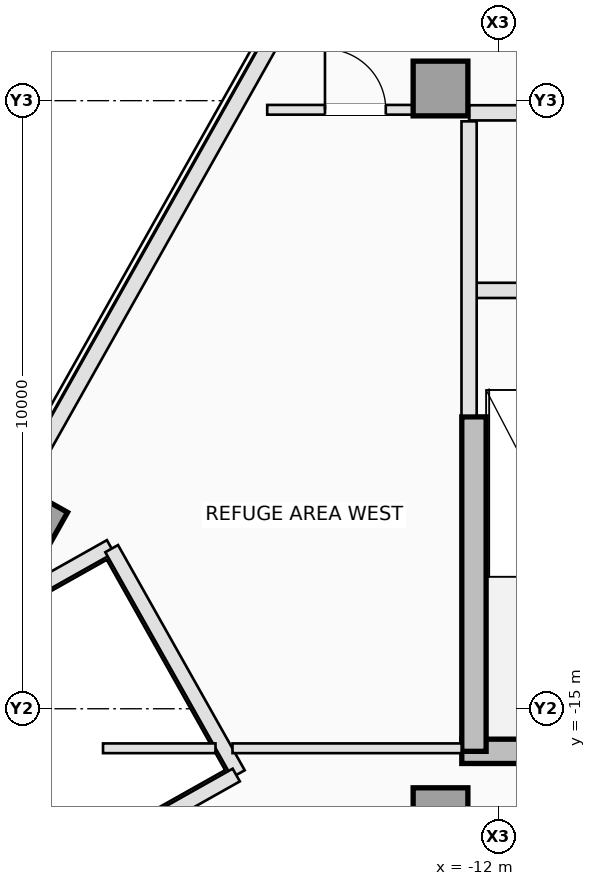
"""IFC4 building model, lengths in metres.
Left out: names, types, materials, properties, quantities, classifications, styles, units other than length and angle.
Written with IfcOpenShell. Run it as: python <this file> out.ifc"""

import sys

from ifc_helpers import new_model, si_unit, direction, frame, frame_2d, origin, origin_2d, place, context, subcontext, project, spatial, rectangle, extrude, element, fill, save


model = new_model("IFC4")
c1 = context("Model", 3, precision=1e-05, world=origin(), true_north=direction((0.0, 1.0)))
c2 = subcontext(c1, "Body", "Model", "MODEL_VIEW")
j1 = project(units=[si_unit("LENGTHUNIT", "METRE"), si_unit("PLANEANGLEUNIT", "RADIAN")], contexts=[c1])
p1 = place(None, origin())
s1 = spatial("IfcSite", under=j1, at=p1, CompositionType="ELEMENT")
p2 = place(p1, origin())
s2 = spatial("IfcBuilding", under=s1, at=p2, CompositionType="ELEMENT")
p3 = place(p2, frame((0.0, 0.0, 179.0)))
s3 = spatial("IfcBuildingStorey", under=s2, at=p3, CompositionType="ELEMENT", Elevation=179.0)
p4 = place(p3, frame((-12.6, -15.7, 0.0), z_axis=(0.0, 0.0, 1.0), x_axis=(1.0, 0.0, 0.0)))
e1 = element("IfcWall", 1, at=p4, inside=s3, PredefinedType="SHEAR", context=c2, shape_type="SweptSolid", body=[
    extrude(rectangle(XDim=3.8, YDim=0.4, at=frame_2d((1.9, 0.0))), origin(), (0.0, 0.0, 1.0), 4.4),
])
p5 = place(p3, frame((-12.4, -15.7, 0.0), z_axis=(0.0, 0.0, 1.0), x_axis=(0.0, 1.0, 0.0)))
e2 = element("IfcWall", 2, at=p5, inside=s3, PredefinedType="SHEAR", context=c2, shape_type="SweptSolid", body=[
    extrude(rectangle(XDim=5.5, YDim=0.4, at=frame_2d((2.75, 0.0))), origin(), (0.0, 0.0, 1.0), 4.4),
])
for number, where, z_axis, x_axis in (
    (3, (-12.95, -16.75, 0.0), (0.0, 0.0, 1.0), (1.0, 0.0, 0.0)),
    (4, (-12.95, -4.8, 0.0), (0.0, 0.0, 1.0), (1.0, 0.0, 0.0)),
    (5, (-19.697, -11.942, 0.0), (0.0, 0.0, 1.0), (-0.872, 0.49, 0.0)),
):
    element("IfcColumn", number, at=place(p3, frame(where, z_axis=z_axis, x_axis=x_axis)), inside=s3, PredefinedType="COLUMN", context=c2, shape_type="SweptSolid", body=[
        extrude(rectangle(XDim=0.9, YDim=0.9, at=origin_2d()), origin(), (0.0, 0.0, 1.0), 4.4),
    ])
p6 = place(p3, frame((-19.844, -11.337, 0.0), z_axis=(0.0, 0.0, 1.0), x_axis=(0.490246958575, 0.871583570066, 0.0)))
e6 = element("IfcWall", 6, at=p6, inside=s3, PredefinedType="STANDARD", context=c2, shape_type="SweptSolid", body=[
    extrude(rectangle(XDim=10.552, YDim=0.26, at=frame_2d((5.276, 0.0))), origin(), (0.0, 0.0, 1.0), 4.15),
])
p7 = place(p3, frame((-20.434, -13.489, 0.0), z_axis=(0.0, 0.0, 1.0), x_axis=(0.871578299909, 0.490256327984, 0.0)))
e7 = element("IfcWall", 7, at=p7, inside=s3, PredefinedType="STANDARD", context=c2, shape_type="SweptSolid", body=[
    extrude(rectangle(XDim=2.36, YDim=0.24, at=frame_2d((1.18, 0.0))), origin(), (0.0, 0.0, 1.0), 4.15),
])
p8 = place(p3, frame((-18.358, -12.366, 0.0), z_axis=(0.0, 0.0, 1.0), x_axis=(0.49027487746, -0.871567865706, 0.0)))
e8 = element("IfcWall", 8, at=p8, inside=s3, PredefinedType="STANDARD", context=c2, shape_type="SweptSolid", body=[
    extrude(rectangle(XDim=4.25, YDim=0.24, at=frame_2d((2.125, 0.0))), origin(), (0.0, 0.0, 1.0), 3.226),
])
p9 = place(p3, frame((-16.309, -16.09, 0.0), z_axis=(0.0, 0.0, 1.0), x_axis=(-0.871578299909, -0.490256327984, 0.0)))
e9 = element("IfcWall", 9, at=p9, inside=s3, PredefinedType="STANDARD", context=c2, shape_type="SweptSolid", body=[
    extrude(rectangle(XDim=2.36, YDim=0.24, at=frame_2d((1.18, 0.0))), origin(), (0.0, 0.0, 1.0), 4.15),
])
p10 = place(p3, frame((-12.38, -8.12, 0.0), z_axis=(0.0, 0.0, 1.0), x_axis=(1.0, 0.0, 0.0)))
e10 = element("IfcWall", 10, at=p10, inside=s3, PredefinedType="PARTITIONING", context=c2, shape_type="SweptSolid", body=[
    extrude(rectangle(XDim=3.22, YDim=0.25, at=frame_2d((1.61, 0.0))), origin(), (0.0, 0.0, 1.0), 4.15),
])
p11 = place(p3, frame((-12.48, -10.18, 0.0), z_axis=(0.0, 0.0, 1.0), x_axis=(0.0, 1.0, 0.0)))
e11 = element("IfcWall", 11, at=p11, inside=s3, PredefinedType="PARTITIONING", context=c2, shape_type="SweptSolid", body=[
    extrude(rectangle(XDim=4.84, YDim=0.25, at=frame_2d((2.42, 0.0))), origin(), (0.0, 0.0, 1.0), 4.15),
])
p12 = place(p3, frame((-12.48, -5.2, 0.0), z_axis=(0.0, 0.0, 1.0), x_axis=(1.0, 0.0, 0.0)))
e12 = element("IfcWall", 12, at=p12, inside=s3, PredefinedType="PARTITIONING", context=c2, shape_type="SweptSolid", body=[
    extrude(rectangle(XDim=8.278, YDim=0.25, at=frame_2d((4.139, 0.0))), origin(), (0.0, 0.0, 1.0), 4.15),
])
p13 = place(p12, frame((1.85, 0.0, 0.0)))
e13 = element("IfcOpeningElement", 13, at=p13, cuts=e12, PredefinedType="OPENING", context=c2, shape_type="SweptSolid", body=[
    extrude(rectangle(XDim=1.05, YDim=2.12, at=frame_2d((0.525, 1.06))), frame((0.0, 0.135, 0.0), z_axis=(0.0, -1.0, 0.0), x_axis=(1.0, 0.0, 0.0)), (0.0, 0.0, 1.0), 0.27),
])
p14 = place(p12, frame((6.15, 0.0, 0.0)))
e14 = element("IfcOpeningElement", 14, at=p14, cuts=e12, PredefinedType="OPENING", context=c2, shape_type="SweptSolid", body=[
    extrude(rectangle(XDim=1.05, YDim=2.12, at=frame_2d((0.525, 1.06))), frame((0.0, 0.135, 0.0), z_axis=(0.0, -1.0, 0.0), x_axis=(1.0, 0.0, 0.0)), (0.0, 0.0, 1.0), 0.27),
])
p15 = place(p3, frame((-18.5, -15.65, 0.0), z_axis=(0.0, 0.0, 1.0), x_axis=(1.0, 0.0, 0.0)))
e15 = element("IfcWall", 15, at=p15, inside=s3, PredefinedType="PARTITIONING", context=c2, shape_type="SweptSolid", body=[
    extrude(rectangle(XDim=1.849, YDim=0.16, at=frame_2d((0.925, 0.0))), origin(), (0.0, 0.0, 1.0), 4.15),
])
p16 = place(p3, frame((-16.371, -15.65, 0.0), z_axis=(0.0, 0.0, 1.0), x_axis=(1.0, 0.0, 0.0)))
e16 = element("IfcWall", 16, at=p16, inside=s3, PredefinedType="PARTITIONING", context=c2, shape_type="SweptSolid", body=[
    extrude(rectangle(XDim=3.769, YDim=0.16, at=frame_2d((1.884, 0.0))), origin(), (0.0, 0.0, 1.0), 4.15),
])
p17 = place(p3, frame((-15.8, -5.15, 0.0), z_axis=(0.0, 0.0, 1.0), x_axis=(1.0, 0.0, 0.0)))
e17 = element("IfcWall", 17, at=p17, inside=s3, PredefinedType="PARTITIONING", context=c2, shape_type="SweptSolid", body=[
    extrude(rectangle(XDim=2.398, YDim=0.16, at=frame_2d((1.199, 0.0))), origin(), (0.0, 0.0, 1.0), 4.15),
])
p18 = place(p17, frame((0.95, 0.0, 0.0)))
e18 = element("IfcOpeningElement", 18, at=p18, cuts=e17, PredefinedType="OPENING", context=c2, shape_type="SweptSolid", body=[
    extrude(rectangle(XDim=1.0, YDim=2.15, at=frame_2d((0.5, 1.075))), frame((0.0, 0.09, 0.0), z_axis=(0.0, -1.0, 0.0), x_axis=(1.0, 0.0, 0.0)), (0.0, 0.0, 1.0), 0.18),
])
p19 = place(p18, origin())
e19 = element("IfcDoor", 19, at=p19, inside=s3, OperationType="SINGLE_SWING_LEFT", PredefinedType="DOOR", context=c2, shape_type="SweptSolid", body=[
    extrude(rectangle(XDim=1.0, YDim=2.15, at=frame_2d((0.5, 1.075))), frame((0.0, 0.025, 0.0), z_axis=(0.0, -1.0, 0.0), x_axis=(1.0, 0.0, 0.0)), (0.0, 0.0, 1.0), 0.05),
])
fill(e18, e19)
save(model, sys.argv[1])
